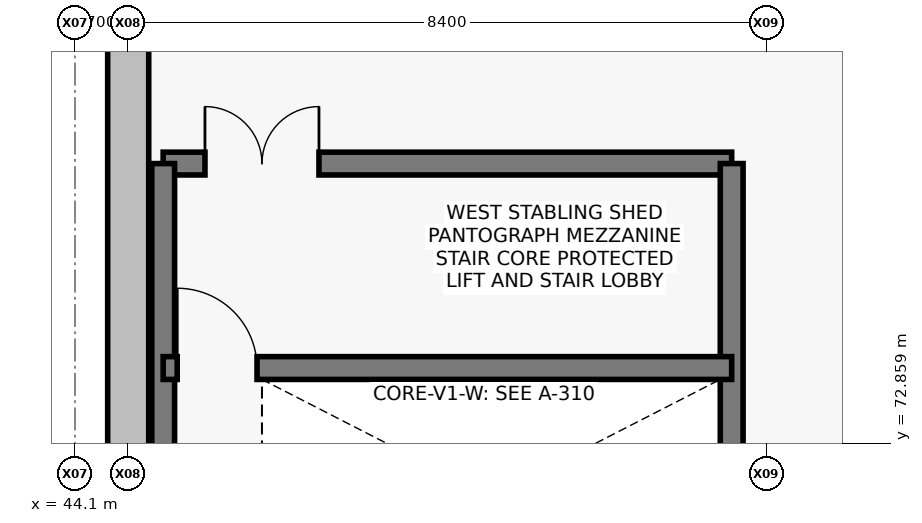
"""IFC4 building model, lengths in metres.
Left out: names, types, materials, properties, quantities, classifications, styles, units other than length and angle.
Written with IfcOpenShell. Run it as: python <this file> out.ifc"""

import sys

from ifc_helpers import new_model, si_unit, direction, frame, frame_2d, origin, place, context, subcontext, project, spatial, rectangle, extrude, element, fill, save


model = new_model("IFC4")
c1 = context("Model", 3, precision=1e-05, world=origin(), true_north=direction((0.0, 1.0)))
c2 = subcontext(c1, "Body", "Model", "MODEL_VIEW")
j1 = project(units=[si_unit("LENGTHUNIT", "METRE"), si_unit("PLANEANGLEUNIT", "RADIAN")], contexts=[c1])
p1 = place(None, origin())
s1 = spatial("IfcSite", under=j1, at=p1, CompositionType="ELEMENT")
p2 = place(p1, origin())
s2 = spatial("IfcBuilding", under=s1, at=p2, CompositionType="ELEMENT")
p3 = place(p2, frame((0.0, 0.0, 6.0)))
s3 = spatial("IfcBuildingStorey", under=s2, at=p3, CompositionType="ELEMENT", Elevation=6.0)
p4 = place(p3, frame((44.8, 70.0, 0.0), z_axis=(0.0, 0.0, 1.0), x_axis=(0.0, 1.0, 0.0)))
e1 = element("IfcWall", 1, at=p4, inside=s3, PredefinedType="SOLIDWALL", context=c2, shape_type="SweptSolid", body=[
    extrude(rectangle(XDim=30.0, YDim=0.54, at=frame_2d((15.0, 0.0))), origin(), (0.0, 0.0, 1.0), 3.6),
])
p5 = place(p3, frame((45.26, 76.54, 0.0), z_axis=(0.0, 0.0, 1.0), x_axis=(1.0, 0.0, 0.0)))
e2 = element("IfcWall", 2, at=p5, inside=s3, PredefinedType="SHEAR", context=c2, shape_type="SweptSolid", body=[
    extrude(rectangle(XDim=7.48, YDim=0.3, at=frame_2d((3.74, 0.0))), origin(), (0.0, 0.0, 1.0), 4.82),
])
p6 = place(p5, frame((0.55, 0.0, 0.0)))
e3 = element("IfcOpeningElement", 3, at=p6, cuts=e2, PredefinedType="OPENING", context=c2, shape_type="SweptSolid", body=[
    extrude(rectangle(XDim=1.5, YDim=2.2, at=frame_2d((0.75, 1.1))), frame((0.0, 0.16, 0.0), z_axis=(0.0, -1.0, 0.0), x_axis=(1.0, 0.0, 0.0)), (0.0, 0.0, 1.0), 0.32),
])
for number, where, z_axis, x_axis in (
    (4, (45.26, 70.46, 0.0), (0.0, 0.0, 1.0), (0.0, 1.0, 0.0)),
    (5, (52.74, 70.46, 0.0), (0.0, 0.0, 1.0), (0.0, 1.0, 0.0)),
):
    element("IfcWall", number, at=place(p3, frame(where, z_axis=z_axis, x_axis=x_axis)), inside=s3, PredefinedType="SHEAR", context=c2, shape_type="SweptSolid", body=[
        extrude(rectangle(XDim=6.08, YDim=0.3, at=frame_2d((3.04, 0.0))), origin(), (0.0, 0.0, 1.0), 4.82),
    ])
p7 = place(p3, frame((45.26, 73.85, 0.0), z_axis=(0.0, 0.0, 1.0), x_axis=(1.0, 0.0, 0.0)))
e6 = element("IfcWall", 6, at=p7, inside=s3, PredefinedType="SHEAR", context=c2, shape_type="SweptSolid", body=[
    extrude(rectangle(XDim=7.48, YDim=0.3, at=frame_2d((3.74, 0.0))), origin(), (0.0, 0.0, 1.0), 4.82),
])
p8 = place(p7, frame((0.185, 0.0, 0.0)))
e7 = element("IfcOpeningElement", 7, at=p8, cuts=e6, PredefinedType="OPENING", context=c2, shape_type="SweptSolid", body=[
    extrude(rectangle(XDim=1.05, YDim=2.15, at=frame_2d((0.525, 1.075))), frame((0.0, 0.16, 0.0), z_axis=(0.0, -1.0, 0.0), x_axis=(1.0, 0.0, 0.0)), (0.0, 0.0, 1.0), 0.32),
])
p9 = place(p8, origin())
e8 = element("IfcDoor", 8, at=p9, inside=s3, OperationType="SINGLE_SWING_LEFT", PredefinedType="DOOR", context=c2, shape_type="SweptSolid", body=[
    extrude(rectangle(XDim=1.05, YDim=2.15, at=frame_2d((0.525, 1.075))), frame((0.0, 0.025, 0.0), z_axis=(0.0, -1.0, 0.0), x_axis=(1.0, 0.0, 0.0)), (0.0, 0.0, 1.0), 0.05),
])
fill(e7, e8)
p10 = place(p6, origin())
e9 = element("IfcDoor", 9, at=p10, inside=s3, OperationType="DOUBLE_DOOR_SINGLE_SWING", PredefinedType="DOOR", context=c2, shape_type="SweptSolid", body=[
    extrude(rectangle(XDim=1.5, YDim=2.2, at=frame_2d((0.75, 1.1))), frame((0.0, 0.025, 0.0), z_axis=(0.0, -1.0, 0.0), x_axis=(1.0, 0.0, 0.0)), (0.0, 0.0, 1.0), 0.05),
])
fill(e3, e9)
save(model, sys.argv[1])
